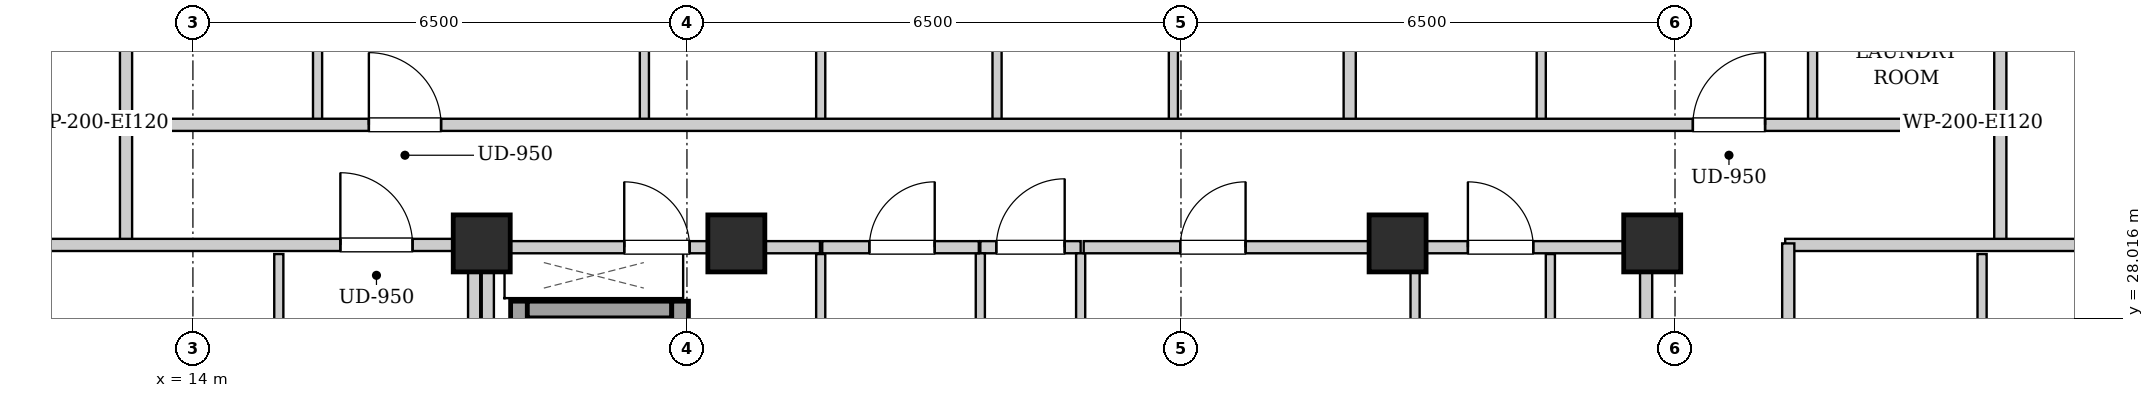
"""IFC4 building model, lengths in metres.
Left out: names, types, materials, properties, quantities, classifications, styles, units other than length and angle.
Written with IfcOpenShell. Run it as: python <this file> out.ifc"""

import sys

from ifc_helpers import new_model, si_unit, direction, frame, frame_2d, origin, origin_2d, place, context, subcontext, project, spatial, rectangle, extrude, element, fill, save


model = new_model("IFC4")
c1 = context("Model", 3, precision=1e-05, world=origin(), true_north=direction((0.0, 1.0)))
c2 = subcontext(c1, "Body", "Model", "MODEL_VIEW")
j1 = project(units=[si_unit("LENGTHUNIT", "METRE"), si_unit("PLANEANGLEUNIT", "RADIAN")], contexts=[c1])
p1 = place(None, origin())
s1 = spatial("IfcSite", under=j1, at=p1, CompositionType="ELEMENT")
p2 = place(p1, origin())
s2 = spatial("IfcBuilding", under=s1, at=p2, CompositionType="ELEMENT")
p3 = place(p2, frame((0.0, 0.0, 251.3)))
s3 = spatial("IfcBuildingStorey", under=s2, at=p3, CompositionType="ELEMENT", Elevation=251.3)
for number, where, z_axis, x_axis in (
    (1, (17.8, 29.0, 0.0), (0.0, 0.0, 1.0), (1.0, 0.0, 0.0)),
    (2, (21.15, 29.0, 0.0), (0.0, 0.0, 1.0), (1.0, 0.0, 0.0)),
    (3, (29.85, 29.0, 0.0), (0.0, 0.0, 1.0), (1.0, 0.0, 0.0)),
    (4, (33.2, 29.0, 0.0), (0.0, 0.0, 1.0), (1.0, 0.0, 0.0)),
):
    element("IfcColumn", number, at=place(p3, frame(where, z_axis=z_axis, x_axis=x_axis)), inside=s3, PredefinedType="COLUMN", context=c2, shape_type="SweptSolid", body=[
        extrude(rectangle(XDim=0.75, YDim=0.75, at=origin_2d()), origin(), (0.0, 0.0, 1.0), 3.4),
    ])
p4 = place(p3, frame((18.29, 24.1, 0.0), z_axis=(0.0, 0.0, 1.0), x_axis=(0.0, 1.0, 0.0)))
e5 = element("IfcWall", 5, at=p4, inside=s3, PredefinedType="SHEAR", context=c2, shape_type="SweptSolid", body=[
    extrude(rectangle(XDim=4.14, YDim=0.22, at=frame_2d((2.07, 0.0))), origin(), (0.0, 0.0, 1.0), 3.14),
])
p5 = place(p3, frame((18.4, 28.13, 0.0), z_axis=(0.0, 0.0, 1.0), x_axis=(1.0, 0.0, 0.0)))
e6 = element("IfcWall", 6, at=p5, inside=s3, PredefinedType="SHEAR", context=c2, shape_type="SweptSolid", body=[
    extrude(rectangle(XDim=1.9, YDim=0.22, at=frame_2d((0.95, 0.0))), origin(), (0.0, 0.0, 1.0), 3.14),
])
p6 = place(p3, frame((20.41, 26.06, 0.0), z_axis=(0.0, 0.0, 1.0), x_axis=(0.0, 1.0, 0.0)))
e7 = element("IfcWall", 7, at=p6, inside=s3, PredefinedType="SHEAR", context=c2, shape_type="SweptSolid", body=[
    extrude(rectangle(XDim=2.18, YDim=0.22, at=frame_2d((1.09, 0.0))), origin(), (0.0, 0.0, 1.0), 3.14),
])
p7 = place(p6, frame((0.54, 0.0, 0.0)))
e8 = element("IfcOpeningElement", 8, at=p7, cuts=e7, PredefinedType="OPENING", context=c2, shape_type="SweptSolid", body=[
    extrude(rectangle(XDim=1.1, YDim=2.15, at=frame_2d((0.55, 1.075))), frame((0.0, 0.12, 0.0), z_axis=(0.0, -1.0, 0.0), x_axis=(1.0, 0.0, 0.0)), (0.0, 0.0, 1.0), 0.24),
])
for number, where, z_axis, x_axis in (
    (9, (17.88, 24.12, 0.0), (0.0, 0.0, 1.0), (0.0, 1.0, 0.0)),
    (10, (33.12, 24.12, 0.0), (0.0, 0.0, 1.0), (0.0, 1.0, 0.0)),
):
    element("IfcWall", number, at=place(p3, frame(where, z_axis=z_axis, x_axis=x_axis)), inside=s3, PredefinedType="PARTITIONING", context=c2, shape_type="SweptSolid", body=[
        extrude(rectangle(XDim=4.76, YDim=0.16, at=frame_2d((2.38, 0.0))), origin(), (0.0, 0.0, 1.0), 3.14),
    ])
p8 = place(p3, frame((24.36, 28.95, 0.0), z_axis=(0.0, 0.0, 1.0), x_axis=(1.0, 0.0, 0.0)))
e11 = element("IfcWall", 11, at=p8, inside=s3, PredefinedType="PARTITIONING", context=c2, shape_type="SweptSolid", body=[
    extrude(rectangle(XDim=1.32, YDim=0.16, at=frame_2d((0.66, 0.0))), origin(), (0.0, 0.0, 1.0), 2.668),
])
p9 = place(p8, frame((0.21, 0.0, 0.0)))
e12 = element("IfcOpeningElement", 12, at=p9, cuts=e11, PredefinedType="OPENING", context=c2, shape_type="SweptSolid", body=[
    extrude(rectangle(XDim=0.9, YDim=2.05, at=frame_2d((0.45, 1.025))), frame((0.0, 0.09, 0.0), z_axis=(0.0, -1.0, 0.0), x_axis=(1.0, 0.0, 0.0)), (0.0, 0.0, 1.0), 0.18),
])
p10 = place(p3, frame((17.96, 28.95, 0.0), z_axis=(0.0, 0.0, 1.0), x_axis=(1.0, 0.0, 0.0)))
e13 = element("IfcWall", 13, at=p10, inside=s3, PredefinedType="PARTITIONING", context=c2, shape_type="SweptSolid", body=[
    extrude(rectangle(XDim=4.29, YDim=0.16, at=frame_2d((2.145, 0.0))), origin(), (0.0, 0.0, 1.0), 2.668),
])
p11 = place(p10, frame((1.715, 0.0, 0.0)))
e14 = element("IfcOpeningElement", 14, at=p11, cuts=e13, PredefinedType="OPENING", context=c2, shape_type="SweptSolid", body=[
    extrude(rectangle(XDim=0.86, YDim=2.05, at=frame_2d((0.43, 1.025))), frame((0.0, 0.09, 0.0), z_axis=(0.0, -1.0, 0.0), x_axis=(1.0, 0.0, 0.0)), (0.0, 0.0, 1.0), 0.18),
])
for number, where, z_axis, x_axis in (
    (15, (24.36, 25.0, 0.0), (0.0, 0.0, 1.0), (0.0, 1.0, 0.0)),
    (16, (25.68, 25.0, 0.0), (0.0, 0.0, 1.0), (0.0, 1.0, 0.0)),
):
    element("IfcWall", number, at=place(p3, frame(where, z_axis=z_axis, x_axis=x_axis)), inside=s3, PredefinedType="PARTITIONING", context=c2, shape_type="SweptSolid", body=[
        extrude(rectangle(XDim=3.87, YDim=0.12, at=frame_2d((1.935, 0.0))), origin(), (0.0, 0.0, 1.0), 3.14),
    ])
p12 = place(p3, frame((30.08, 26.18, 0.0), z_axis=(0.0, 0.0, 1.0), x_axis=(0.0, 1.0, 0.0)))
e17 = element("IfcWall", 17, at=p12, inside=s3, PredefinedType="PARTITIONING", context=c2, shape_type="SweptSolid", body=[
    extrude(rectangle(XDim=2.68, YDim=0.12, at=frame_2d((1.34, 0.0))), origin(), (0.0, 0.0, 1.0), 3.14),
])
p13 = place(p3, frame((31.86, 26.2, 0.0), z_axis=(0.0, 0.0, 1.0), x_axis=(0.0, 1.0, 0.0)))
e18 = element("IfcWall", 18, at=p13, inside=s3, PredefinedType="PARTITIONING", context=c2, shape_type="SweptSolid", body=[
    extrude(rectangle(XDim=2.66, YDim=0.12, at=frame_2d((1.33, 0.0))), origin(), (0.0, 0.0, 1.0), 3.14),
])
p14 = place(p13, frame((0.92, 0.0, 0.0)))
e19 = element("IfcOpeningElement", 19, at=p14, cuts=e18, PredefinedType="OPENING", context=c2, shape_type="SweptSolid", body=[
    extrude(rectangle(XDim=0.86, YDim=2.05, at=frame_2d((0.43, 1.025))), frame((0.0, 0.07, 0.0), z_axis=(0.0, -1.0, 0.0), x_axis=(1.0, 0.0, 0.0)), (0.0, 0.0, 1.0), 0.14),
])
p15 = place(p3, frame((30.08, 28.95, 0.0), z_axis=(0.0, 0.0, 1.0), x_axis=(1.0, 0.0, 0.0)))
e20 = element("IfcWall", 20, at=p15, inside=s3, PredefinedType="PARTITIONING", context=c2, shape_type="SweptSolid", body=[
    extrude(rectangle(XDim=2.96, YDim=0.16, at=frame_2d((1.48, 0.0))), origin(), (0.0, 0.0, 1.0), 3.14),
])
p16 = place(p15, frame((0.695, 0.0, 0.0)))
e21 = element("IfcOpeningElement", 21, at=p16, cuts=e20, PredefinedType="OPENING", context=c2, shape_type="SweptSolid", body=[
    extrude(rectangle(XDim=0.86, YDim=2.05, at=frame_2d((0.43, 1.025))), frame((0.0, 0.09, 0.0), z_axis=(0.0, -1.0, 0.0), x_axis=(1.0, 0.0, 0.0)), (0.0, 0.0, 1.0), 0.18),
])
p17 = place(p3, frame((22.26, 25.0, 0.0), z_axis=(0.0, 0.0, 1.0), x_axis=(0.0, 1.0, 0.0)))
e22 = element("IfcWall", 22, at=p17, inside=s3, PredefinedType="PARTITIONING", context=c2, shape_type="SweptSolid", body=[
    extrude(rectangle(XDim=3.86, YDim=0.12, at=frame_2d((1.93, 0.0))), origin(), (0.0, 0.0, 1.0), 3.14),
])
p18 = place(p3, frame((22.28, 28.95, 0.0), z_axis=(0.0, 0.0, 1.0), x_axis=(1.0, 0.0, 0.0)))
e23 = element("IfcWall", 23, at=p18, inside=s3, PredefinedType="PARTITIONING", context=c2, shape_type="SweptSolid", body=[
    extrude(rectangle(XDim=2.06, YDim=0.16, at=frame_2d((1.03, 0.0))), origin(), (0.0, 0.0, 1.0), 2.668),
])
p19 = place(p18, frame((0.62, 0.0, 0.0)))
e24 = element("IfcOpeningElement", 24, at=p19, cuts=e23, PredefinedType="OPENING", context=c2, shape_type="SweptSolid", body=[
    extrude(rectangle(XDim=0.86, YDim=2.05, at=frame_2d((0.43, 1.025))), frame((0.0, 0.09, 0.0), z_axis=(0.0, -1.0, 0.0), x_axis=(1.0, 0.0, 0.0)), (0.0, 0.0, 1.0), 0.18),
])
p20 = place(p3, frame((25.72, 28.95, 0.0), z_axis=(0.0, 0.0, 1.0), x_axis=(1.0, 0.0, 0.0)))
e25 = element("IfcWall", 25, at=p20, inside=s3, PredefinedType="PARTITIONING", context=c2, shape_type="SweptSolid", body=[
    extrude(rectangle(XDim=4.32, YDim=0.16, at=frame_2d((2.16, 0.0))), origin(), (0.0, 0.0, 1.0), 2.668),
])
p21 = place(p20, frame((1.27, 0.0, 0.0)))
e26 = element("IfcOpeningElement", 26, at=p21, cuts=e25, PredefinedType="OPENING", context=c2, shape_type="SweptSolid", body=[
    extrude(rectangle(XDim=0.86, YDim=2.05, at=frame_2d((0.43, 1.025))), frame((0.0, 0.09, 0.0), z_axis=(0.0, -1.0, 0.0), x_axis=(1.0, 0.0, 0.0)), (0.0, 0.0, 1.0), 0.18),
])
for number, where, z_axis, x_axis in (
    (27, (13.12, 28.98, 0.0), (0.0, 0.0, 1.0), (0.0, 1.0, 0.0)),
    (28, (37.78, 28.98, 0.0), (0.0, 0.0, 1.0), (0.0, 1.0, 0.0)),
):
    element("IfcWall", number, at=place(p3, frame(where, z_axis=z_axis, x_axis=x_axis)), inside=s3, PredefinedType="PARTITIONING", context=c2, shape_type="SweptSolid", body=[
        extrude(rectangle(XDim=1.58, YDim=0.16, at=frame_2d((0.79, 0.0))), origin(), (0.0, 0.0, 1.0), 3.14),
    ])
p22 = place(p3, frame((34.95, 28.98, 0.0), z_axis=(0.0, 0.0, 1.0), x_axis=(1.0, 0.0, 0.0)))
e29 = element("IfcWall", 29, at=p22, inside=s3, PredefinedType="PARTITIONING", context=c2, shape_type="SweptSolid", body=[
    extrude(rectangle(XDim=5.07, YDim=0.16, at=frame_2d((2.535, 0.0))), origin(), (0.0, 0.0, 1.0), 2.668),
])
p23 = place(p3, frame((13.12, 30.6, 0.0), z_axis=(0.0, 0.0, 1.0), x_axis=(0.0, 1.0, 0.0)))
e30 = element("IfcWall", 30, at=p23, inside=s3, PredefinedType="PARTITIONING", context=c2, shape_type="SweptSolid", body=[
    extrude(rectangle(XDim=2.91, YDim=0.16, at=frame_2d((1.455, 0.0))), origin(), (0.0, 0.0, 1.0), 3.14),
])
p24 = place(p3, frame((15.64, 30.6, 0.0), z_axis=(0.0, 0.0, 1.0), x_axis=(0.0, 1.0, 0.0)))
e31 = element("IfcWall", 31, at=p24, inside=s3, PredefinedType="PARTITIONING", context=c2, shape_type="SweptSolid", body=[
    extrude(rectangle(XDim=2.85, YDim=0.12, at=frame_2d((1.425, 0.0))), origin(), (0.0, 0.0, 1.0), 3.14),
])
p25 = place(p24, frame((0.995, 0.0, 0.0)))
e32 = element("IfcOpeningElement", 32, at=p25, cuts=e31, PredefinedType="OPENING", context=c2, shape_type="SweptSolid", body=[
    extrude(rectangle(XDim=0.86, YDim=2.05, at=frame_2d((0.43, 1.025))), frame((0.0, 0.07, 0.0), z_axis=(0.0, -1.0, 0.0), x_axis=(1.0, 0.0, 0.0)), (0.0, 0.0, 1.0), 0.14),
])
p26 = place(p3, frame((19.94, 30.6, 0.0), z_axis=(0.0, 0.0, 1.0), x_axis=(0.0, 1.0, 0.0)))
e33 = element("IfcWall", 33, at=p26, inside=s3, PredefinedType="PARTITIONING", context=c2, shape_type="SweptSolid", body=[
    extrude(rectangle(XDim=2.85, YDim=0.12, at=frame_2d((1.425, 0.0))), origin(), (0.0, 0.0, 1.0), 3.14),
])
p27 = place(p26, frame((0.975, 0.0, 0.0)))
e34 = element("IfcOpeningElement", 34, at=p27, cuts=e33, PredefinedType="OPENING", context=c2, shape_type="SweptSolid", body=[
    extrude(rectangle(XDim=0.9, YDim=2.05, at=frame_2d((0.45, 1.025))), frame((0.0, 0.07, 0.0), z_axis=(0.0, -1.0, 0.0), x_axis=(1.0, 0.0, 0.0)), (0.0, 0.0, 1.0), 0.14),
])
p28 = place(p3, frame((22.26, 30.6, 0.0), z_axis=(0.0, 0.0, 1.0), x_axis=(0.0, 1.0, 0.0)))
e35 = element("IfcWall", 35, at=p28, inside=s3, PredefinedType="PARTITIONING", context=c2, shape_type="SweptSolid", body=[
    extrude(rectangle(XDim=2.85, YDim=0.12, at=frame_2d((1.425, 0.0))), origin(), (0.0, 0.0, 1.0), 3.14),
])
p29 = place(p28, frame((0.975, 0.0, 0.0)))
e36 = element("IfcOpeningElement", 36, at=p29, cuts=e35, PredefinedType="OPENING", context=c2, shape_type="SweptSolid", body=[
    extrude(rectangle(XDim=0.9, YDim=2.05, at=frame_2d((0.45, 1.025))), frame((0.0, 0.07, 0.0), z_axis=(0.0, -1.0, 0.0), x_axis=(1.0, 0.0, 0.0)), (0.0, 0.0, 1.0), 0.14),
])
p30 = place(p3, frame((24.58, 30.6, 0.0), z_axis=(0.0, 0.0, 1.0), x_axis=(0.0, 1.0, 0.0)))
e37 = element("IfcWall", 37, at=p30, inside=s3, PredefinedType="PARTITIONING", context=c2, shape_type="SweptSolid", body=[
    extrude(rectangle(XDim=2.85, YDim=0.12, at=frame_2d((1.425, 0.0))), origin(), (0.0, 0.0, 1.0), 3.14),
])
p31 = place(p30, frame((0.975, 0.0, 0.0)))
e38 = element("IfcOpeningElement", 38, at=p31, cuts=e37, PredefinedType="OPENING", context=c2, shape_type="SweptSolid", body=[
    extrude(rectangle(XDim=0.9, YDim=2.05, at=frame_2d((0.45, 1.025))), frame((0.0, 0.07, 0.0), z_axis=(0.0, -1.0, 0.0), x_axis=(1.0, 0.0, 0.0)), (0.0, 0.0, 1.0), 0.14),
])
p32 = place(p3, frame((26.9, 30.6, 0.0), z_axis=(0.0, 0.0, 1.0), x_axis=(0.0, 1.0, 0.0)))
e39 = element("IfcWall", 39, at=p32, inside=s3, PredefinedType="PARTITIONING", context=c2, shape_type="SweptSolid", body=[
    extrude(rectangle(XDim=2.85, YDim=0.12, at=frame_2d((1.425, 0.0))), origin(), (0.0, 0.0, 1.0), 3.14),
])
p33 = place(p32, frame((0.975, 0.0, 0.0)))
e40 = element("IfcOpeningElement", 40, at=p33, cuts=e39, PredefinedType="OPENING", context=c2, shape_type="SweptSolid", body=[
    extrude(rectangle(XDim=0.9, YDim=2.05, at=frame_2d((0.45, 1.025))), frame((0.0, 0.07, 0.0), z_axis=(0.0, -1.0, 0.0), x_axis=(1.0, 0.0, 0.0)), (0.0, 0.0, 1.0), 0.14),
])
p34 = place(p3, frame((37.78, 30.6, 0.0), z_axis=(0.0, 0.0, 1.0), x_axis=(0.0, 1.0, 0.0)))
e41 = element("IfcWall", 41, at=p34, inside=s3, PredefinedType="PARTITIONING", context=c2, shape_type="SweptSolid", body=[
    extrude(rectangle(XDim=2.91, YDim=0.16, at=frame_2d((1.455, 0.0))), origin(), (0.0, 0.0, 1.0), 3.14),
])
p35 = place(p3, frame((29.22, 30.6, 0.0), z_axis=(0.0, 0.0, 1.0), x_axis=(0.0, 1.0, 0.0)))
e42 = element("IfcWall", 42, at=p35, inside=s3, PredefinedType="PARTITIONING", context=c2, shape_type="SweptSolid", body=[
    extrude(rectangle(XDim=9.32, YDim=0.16, at=frame_2d((4.66, 0.0))), origin(), (0.0, 0.0, 1.0), 3.14),
])
p36 = place(p3, frame((31.74, 30.6, 0.0), z_axis=(0.0, 0.0, 1.0), x_axis=(0.0, 1.0, 0.0)))
e43 = element("IfcWall", 43, at=p36, inside=s3, PredefinedType="PARTITIONING", context=c2, shape_type="SweptSolid", body=[
    extrude(rectangle(XDim=2.85, YDim=0.12, at=frame_2d((1.425, 0.0))), origin(), (0.0, 0.0, 1.0), 3.14),
])
p37 = place(p36, frame((0.995, 0.0, 0.0)))
e44 = element("IfcOpeningElement", 44, at=p37, cuts=e43, PredefinedType="OPENING", context=c2, shape_type="SweptSolid", body=[
    extrude(rectangle(XDim=0.86, YDim=2.05, at=frame_2d((0.43, 1.025))), frame((0.0, 0.07, 0.0), z_axis=(0.0, -1.0, 0.0), x_axis=(1.0, 0.0, 0.0)), (0.0, 0.0, 1.0), 0.14),
])
p38 = place(p3, frame((35.31, 30.6, 0.0), z_axis=(0.0, 0.0, 1.0), x_axis=(0.0, 1.0, 0.0)))
e45 = element("IfcWall", 45, at=p38, inside=s3, PredefinedType="PARTITIONING", context=c2, shape_type="SweptSolid", body=[
    extrude(rectangle(XDim=2.85, YDim=0.12, at=frame_2d((1.425, 0.0))), origin(), (0.0, 0.0, 1.0), 3.14),
])
p39 = place(p38, frame((0.975, 0.0, 0.0)))
e46 = element("IfcOpeningElement", 46, at=p39, cuts=e45, PredefinedType="OPENING", context=c2, shape_type="SweptSolid", body=[
    extrude(rectangle(XDim=0.9, YDim=2.05, at=frame_2d((0.45, 1.025))), frame((0.0, 0.07, 0.0), z_axis=(0.0, -1.0, 0.0), x_axis=(1.0, 0.0, 0.0)), (0.0, 0.0, 1.0), 0.14),
])
p40 = place(p3, frame((10.88, 28.98, 0.0), z_axis=(0.0, 0.0, 1.0), x_axis=(1.0, 0.0, 0.0)))
e47 = element("IfcWall", 47, at=p40, inside=s3, PredefinedType="PARTITIONING", context=c2, shape_type="SweptSolid", body=[
    extrude(rectangle(XDim=6.88, YDim=0.16, at=frame_2d((3.44, 0.0))), origin(), (0.0, 0.0, 1.0), 2.668),
])
p41 = place(p40, frame((5.06, 0.0, 0.0)))
e48 = element("IfcOpeningElement", 48, at=p41, cuts=e47, PredefinedType="OPENING", context=c2, shape_type="SweptSolid", body=[
    extrude(rectangle(XDim=0.95, YDim=2.1, at=frame_2d((0.475, 1.05))), frame((0.0, 0.09, 0.0), z_axis=(0.0, -1.0, 0.0), x_axis=(1.0, 0.0, 0.0)), (0.0, 0.0, 1.0), 0.18),
])
p42 = place(p3, frame((15.13, 25.052, 0.0), z_axis=(0.0, 0.0, 1.0), x_axis=(0.0, 1.0, 0.0)))
e49 = element("IfcWall", 49, at=p42, inside=s3, PredefinedType="PARTITIONING", context=c2, shape_type="SweptSolid", body=[
    extrude(rectangle(XDim=3.808, YDim=0.12, at=frame_2d((1.904, 0.0))), origin(), (0.0, 0.0, 1.0), 3.14),
])
p43 = place(p42, frame((1.454, 0.0, 0.0)))
e50 = element("IfcOpeningElement", 50, at=p43, cuts=e49, PredefinedType="OPENING", context=c2, shape_type="SweptSolid", body=[
    extrude(rectangle(XDim=0.9, YDim=2.05, at=frame_2d((0.45, 1.025))), frame((0.0, 0.07, 0.0), z_axis=(0.0, -1.0, 0.0), x_axis=(1.0, 0.0, 0.0)), (0.0, 0.0, 1.0), 0.14),
])
p44 = place(p3, frame((37.54, 24.552, 0.0), z_axis=(0.0, 0.0, 1.0), x_axis=(0.0, 1.0, 0.0)))
e51 = element("IfcWall", 51, at=p44, inside=s3, PredefinedType="PARTITIONING", context=c2, shape_type="SweptSolid", body=[
    extrude(rectangle(XDim=4.308, YDim=0.12, at=frame_2d((2.154, 0.0))), origin(), (0.0, 0.0, 1.0), 3.14),
])
p45 = place(p44, frame((1.704, 0.0, 0.0)))
e52 = element("IfcOpeningElement", 52, at=p45, cuts=e51, PredefinedType="OPENING", context=c2, shape_type="SweptSolid", body=[
    extrude(rectangle(XDim=0.9, YDim=2.05, at=frame_2d((0.45, 1.025))), frame((0.0, 0.07, 0.0), z_axis=(0.0, -1.0, 0.0), x_axis=(1.0, 0.0, 0.0)), (0.0, 0.0, 1.0), 0.14),
])
p46 = place(p3, frame((13.15, 30.56, 0.0), z_axis=(0.0, 0.0, 1.0), x_axis=(1.0, 0.0, 0.0)))
e53 = element("IfcWall", 53, at=p46, inside=s3, PredefinedType="PARTITIONING", context=c2, shape_type="SweptSolid", body=[
    extrude(rectangle(XDim=24.6, YDim=0.16, at=frame_2d((12.3, 0.0))), origin(), (0.0, 0.0, 1.0), 3.14),
])
p47 = place(p46, frame((3.165, 0.0, 0.0)))
e54 = element("IfcOpeningElement", 54, at=p47, cuts=e53, PredefinedType="OPENING", context=c2, shape_type="SweptSolid", body=[
    extrude(rectangle(XDim=0.95, YDim=2.1, at=frame_2d((0.475, 1.05))), frame((0.0, 0.09, 0.0), z_axis=(0.0, -1.0, 0.0), x_axis=(1.0, 0.0, 0.0)), (0.0, 0.0, 1.0), 0.18),
])
p48 = place(p46, frame((20.585, 0.0, 0.0)))
e55 = element("IfcOpeningElement", 55, at=p48, cuts=e53, PredefinedType="OPENING", context=c2, shape_type="SweptSolid", body=[
    extrude(rectangle(XDim=0.95, YDim=2.1, at=frame_2d((0.475, 1.05))), frame((0.0, 0.09, 0.0), z_axis=(0.0, -1.0, 0.0), x_axis=(1.0, 0.0, 0.0)), (0.0, 0.0, 1.0), 0.18),
])
p49 = place(p3, frame((17.7, 15.02, 0.0), z_axis=(0.0, 0.0, 1.0), x_axis=(0.0, 1.0, 0.0)))
e56 = element("IfcWall", 56, at=p49, inside=s3, PredefinedType="PARTITIONING", context=c2, shape_type="SweptSolid", body=[
    extrude(rectangle(XDim=13.98, YDim=0.16, at=frame_2d((6.99, 0.0))), origin(), (0.0, 0.0, 1.0), 3.14),
])
p50 = place(p3, frame((34.99, 15.07, 0.0), z_axis=(0.0, 0.0, 1.0), x_axis=(0.0, 1.0, 0.0)))
e57 = element("IfcWall", 57, at=p50, inside=s3, PredefinedType="PARTITIONING", context=c2, shape_type="SweptSolid", body=[
    extrude(rectangle(XDim=13.93, YDim=0.16, at=frame_2d((6.965, 0.0))), origin(), (0.0, 0.0, 1.0), 3.14),
])
p51 = place(p50, frame((4.385, 0.0, 0.0)))
e58 = element("IfcOpeningElement", 58, at=p51, cuts=e57, PredefinedType="OPENING", context=c2, shape_type="SweptSolid", body=[
    extrude(rectangle(XDim=0.95, YDim=2.1, at=frame_2d((0.475, 1.05))), frame((0.0, 0.09, 0.0), z_axis=(0.0, -1.0, 0.0), x_axis=(1.0, 0.0, 0.0)), (0.0, 0.0, 1.0), 0.18),
])
p52 = place(p9, origin())
e59 = element("IfcDoor", 59, at=p52, inside=s3, OperationType="SINGLE_SWING_RIGHT", PredefinedType="DOOR", context=c2, shape_type="SweptSolid", body=[
    extrude(rectangle(XDim=0.9, YDim=2.05, at=frame_2d((0.45, 1.025))), frame((0.0, 0.025, 0.0), z_axis=(0.0, -1.0, 0.0), x_axis=(1.0, 0.0, 0.0)), (0.0, 0.0, 1.0), 0.05),
])
fill(e12, e59)
p53 = place(p11, origin())
e60 = element("IfcDoor", 60, at=p53, inside=s3, OperationType="SINGLE_SWING_LEFT", PredefinedType="DOOR", context=c2, shape_type="SweptSolid", body=[
    extrude(rectangle(XDim=0.86, YDim=2.05, at=frame_2d((0.43, 1.025))), frame((0.0, 0.025, 0.0), z_axis=(0.0, -1.0, 0.0), x_axis=(1.0, 0.0, 0.0)), (0.0, 0.0, 1.0), 0.05),
])
fill(e14, e60)
p54 = place(p16, origin())
e61 = element("IfcDoor", 61, at=p54, inside=s3, OperationType="SINGLE_SWING_LEFT", PredefinedType="DOOR", context=c2, shape_type="SweptSolid", body=[
    extrude(rectangle(XDim=0.86, YDim=2.05, at=frame_2d((0.43, 1.025))), frame((0.0, 0.025, 0.0), z_axis=(0.0, -1.0, 0.0), x_axis=(1.0, 0.0, 0.0)), (0.0, 0.0, 1.0), 0.05),
])
fill(e21, e61)
p55 = place(p19, origin())
e62 = element("IfcDoor", 62, at=p55, inside=s3, OperationType="SINGLE_SWING_RIGHT", PredefinedType="DOOR", context=c2, shape_type="SweptSolid", body=[
    extrude(rectangle(XDim=0.86, YDim=2.05, at=frame_2d((0.43, 1.025))), frame((0.0, 0.025, 0.0), z_axis=(0.0, -1.0, 0.0), x_axis=(1.0, 0.0, 0.0)), (0.0, 0.0, 1.0), 0.05),
])
fill(e24, e62)
p56 = place(p21, origin())
e63 = element("IfcDoor", 63, at=p56, inside=s3, OperationType="SINGLE_SWING_RIGHT", PredefinedType="DOOR", context=c2, shape_type="SweptSolid", body=[
    extrude(rectangle(XDim=0.86, YDim=2.05, at=frame_2d((0.43, 1.025))), frame((0.0, 0.025, 0.0), z_axis=(0.0, -1.0, 0.0), x_axis=(1.0, 0.0, 0.0)), (0.0, 0.0, 1.0), 0.05),
])
fill(e26, e63)
p57 = place(p41, origin())
e64 = element("IfcDoor", 64, at=p57, inside=s3, OperationType="SINGLE_SWING_LEFT", PredefinedType="DOOR", context=c2, shape_type="SweptSolid", body=[
    extrude(rectangle(XDim=0.95, YDim=2.1, at=frame_2d((0.475, 1.05))), frame((0.0, 0.025, 0.0), z_axis=(0.0, -1.0, 0.0), x_axis=(1.0, 0.0, 0.0)), (0.0, 0.0, 1.0), 0.05),
])
fill(e48, e64)
p58 = place(p47, origin())
e65 = element("IfcDoor", 65, at=p58, inside=s3, OperationType="SINGLE_SWING_LEFT", PredefinedType="DOOR", context=c2, shape_type="SweptSolid", body=[
    extrude(rectangle(XDim=0.95, YDim=2.1, at=frame_2d((0.475, 1.05))), frame((0.0, 0.025, 0.0), z_axis=(0.0, -1.0, 0.0), x_axis=(1.0, 0.0, 0.0)), (0.0, 0.0, 1.0), 0.05),
])
fill(e54, e65)
p59 = place(p48, origin())
e66 = element("IfcDoor", 66, at=p59, inside=s3, OperationType="SINGLE_SWING_RIGHT", PredefinedType="DOOR", context=c2, shape_type="SweptSolid", body=[
    extrude(rectangle(XDim=0.95, YDim=2.1, at=frame_2d((0.475, 1.05))), frame((0.0, 0.025, 0.0), z_axis=(0.0, -1.0, 0.0), x_axis=(1.0, 0.0, 0.0)), (0.0, 0.0, 1.0), 0.05),
])
fill(e55, e66)
save(model, sys.argv[1])
